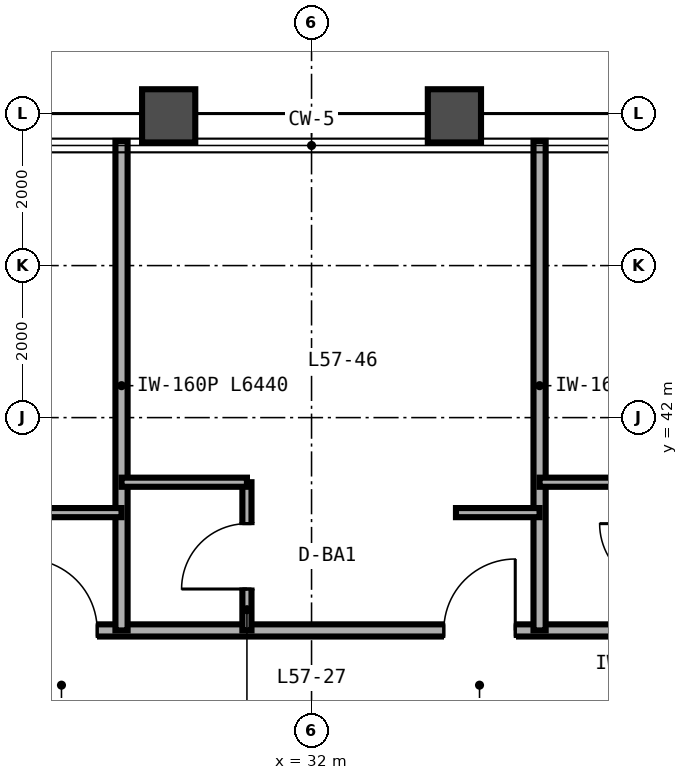
"""IFC4 building model, lengths in metres.
Left out: names, types, materials, properties, quantities, classifications, styles, units other than length and angle.
Written with IfcOpenShell. Run it as: python <this file> out.ifc"""

import sys

from ifc_helpers import new_model, si_unit, direction, frame, frame_2d, origin, place, context, subcontext, project, spatial, rectangle, extrude, source, transform, mapped, element, fill, save


model = new_model("IFC4")
c1 = context("Model", 3, precision=1e-05, world=origin(), true_north=direction((0.0, 1.0)))
c2 = subcontext(c1, "Body", "Model", "MODEL_VIEW")
j1 = project(units=[si_unit("LENGTHUNIT", "METRE"), si_unit("PLANEANGLEUNIT", "RADIAN")], contexts=[c1])
p1 = place(None, origin())
s1 = spatial("IfcSite", under=j1, at=p1, CompositionType="ELEMENT")
p2 = place(p1, origin())
s2 = spatial("IfcBuilding", under=s1, at=p2, CompositionType="ELEMENT")
p3 = place(p2, frame((0.0, 0.0, 228.0)))
s3 = spatial("IfcBuildingStorey", under=s2, at=p3, CompositionType="ELEMENT", Elevation=228.0)
p4 = place(p3, frame((14.0, 39.2, 0.0), z_axis=(0.0, 0.0, 1.0), x_axis=(1.0, 0.0, 0.0)))
e1 = element("IfcWall", 1, at=p4, inside=s3, PredefinedType="PARTITIONING", context=c2, shape_type="SweptSolid", body=[
    extrude(rectangle(XDim=36.0, YDim=0.16, at=frame_2d((18.0, 0.0))), origin(), (0.0, 0.0, 1.0), 4.123),
])
p5 = place(p4, frame((3.74, 0.0, 0.0)))
e2 = element("IfcOpeningElement", 2, at=p5, cuts=e1, PredefinedType="OPENING", context=c2, shape_type="SweptSolid", body=[
    extrude(rectangle(XDim=0.94, YDim=2.15, at=frame_2d((0.47, 1.075))), frame((0.0, 0.09, 0.0), z_axis=(0.0, -1.0, 0.0), x_axis=(1.0, 0.0, 0.0)), (0.0, 0.0, 1.0), 0.18),
])
p6 = place(p4, frame((8.74, 0.0, 0.0)))
e3 = element("IfcOpeningElement", 3, at=p6, cuts=e1, PredefinedType="OPENING", context=c2, shape_type="SweptSolid", body=[
    extrude(rectangle(XDim=0.94, YDim=2.15, at=frame_2d((0.47, 1.075))), frame((0.0, 0.09, 0.0), z_axis=(0.0, -1.0, 0.0), x_axis=(1.0, 0.0, 0.0)), (0.0, 0.0, 1.0), 0.18),
])
p7 = place(p4, frame((14.24, 0.0, 0.0)))
e4 = element("IfcOpeningElement", 4, at=p7, cuts=e1, PredefinedType="OPENING", context=c2, shape_type="SweptSolid", body=[
    extrude(rectangle(XDim=0.94, YDim=2.15, at=frame_2d((0.47, 1.075))), frame((0.0, 0.09, 0.0), z_axis=(0.0, -1.0, 0.0), x_axis=(1.0, 0.0, 0.0)), (0.0, 0.0, 1.0), 0.18),
])
p8 = place(p4, frame((19.74, 0.0, 0.0)))
e5 = element("IfcOpeningElement", 5, at=p8, cuts=e1, PredefinedType="OPENING", context=c2, shape_type="SweptSolid", body=[
    extrude(rectangle(XDim=0.94, YDim=2.15, at=frame_2d((0.47, 1.075))), frame((0.0, 0.09, 0.0), z_axis=(0.0, -1.0, 0.0), x_axis=(1.0, 0.0, 0.0)), (0.0, 0.0, 1.0), 0.18),
])
p9 = place(p4, frame((25.24, 0.0, 0.0)))
e6 = element("IfcOpeningElement", 6, at=p9, cuts=e1, PredefinedType="OPENING", context=c2, shape_type="SweptSolid", body=[
    extrude(rectangle(XDim=0.94, YDim=2.15, at=frame_2d((0.47, 1.075))), frame((0.0, 0.09, 0.0), z_axis=(0.0, -1.0, 0.0), x_axis=(1.0, 0.0, 0.0)), (0.0, 0.0, 1.0), 0.18),
])
p10 = place(p4, frame((30.24, 0.0, 0.0)))
e7 = element("IfcOpeningElement", 7, at=p10, cuts=e1, PredefinedType="OPENING", context=c2, shape_type="SweptSolid", body=[
    extrude(rectangle(XDim=0.94, YDim=2.15, at=frame_2d((0.47, 1.075))), frame((0.0, 0.09, 0.0), z_axis=(0.0, -1.0, 0.0), x_axis=(1.0, 0.0, 0.0)), (0.0, 0.0, 1.0), 0.18),
])
p11 = place(p4, frame((34.74, 0.0, 0.0)))
e8 = element("IfcOpeningElement", 8, at=p11, cuts=e1, PredefinedType="OPENING", context=c2, shape_type="SweptSolid", body=[
    extrude(rectangle(XDim=0.94, YDim=2.15, at=frame_2d((0.47, 1.075))), frame((0.0, 0.09, 0.0), z_axis=(0.0, -1.0, 0.0), x_axis=(1.0, 0.0, 0.0)), (0.0, 0.0, 1.0), 0.18),
])
p12 = place(p3, frame((29.5, 39.2, 0.0), z_axis=(0.0, 0.0, 1.0), x_axis=(0.0, 1.0, 0.0)))
e9 = element("IfcWall", 9, at=p12, inside=s3, PredefinedType="PARTITIONING", context=c2, shape_type="SweptSolid", body=[
    extrude(rectangle(XDim=6.44, YDim=0.16, at=frame_2d((3.22, 0.0))), origin(), (0.0, 0.0, 1.0), 3.653),
])
p13 = place(p3, frame((28.4, 40.75, 0.0), z_axis=(0.0, 0.0, 1.0), x_axis=(1.0, 0.0, 0.0)))
e10 = element("IfcWall", 10, at=p13, inside=s3, PredefinedType="PARTITIONING", context=c2, shape_type="SweptSolid", body=[
    extrude(rectangle(XDim=1.1, YDim=0.12, at=frame_2d((0.55, 0.0))), origin(), (0.0, 0.0, 1.0), 4.58),
])
p14 = place(p3, frame((35.0, 39.2, 0.0), z_axis=(0.0, 0.0, 1.0), x_axis=(0.0, 1.0, 0.0)))
e11 = element("IfcWall", 11, at=p14, inside=s3, PredefinedType="PARTITIONING", context=c2, shape_type="SweptSolid", body=[
    extrude(rectangle(XDim=6.44, YDim=0.16, at=frame_2d((3.22, 0.0))), origin(), (0.0, 0.0, 1.0), 3.653),
])
p15 = place(p3, frame((31.15, 39.2, 0.0), z_axis=(0.0, 0.0, 1.0), x_axis=(0.0, 1.0, 0.0)))
e12 = element("IfcWall", 12, at=p15, inside=s3, PredefinedType="PARTITIONING", context=c2, shape_type="SweptSolid", body=[
    extrude(rectangle(XDim=1.95, YDim=0.12, at=frame_2d((0.975, 0.0))), origin(), (0.0, 0.0, 1.0), 4.58),
])
p16 = place(p15, frame((0.545, 0.0, 0.0)))
e13 = element("IfcOpeningElement", 13, at=p16, cuts=e12, PredefinedType="OPENING", context=c2, shape_type="SweptSolid", body=[
    extrude(rectangle(XDim=0.86, YDim=2.1, at=frame_2d((0.43, 1.05))), frame((0.0, 0.07, 0.0), z_axis=(0.0, -1.0, 0.0), x_axis=(1.0, 0.0, 0.0)), (0.0, 0.0, 1.0), 0.14),
])
p17 = place(p3, frame((29.5, 41.15, 0.0), z_axis=(0.0, 0.0, 1.0), x_axis=(1.0, 0.0, 0.0)))
e14 = element("IfcWall", 14, at=p17, inside=s3, PredefinedType="PARTITIONING", context=c2, shape_type="SweptSolid", body=[
    extrude(rectangle(XDim=1.65, YDim=0.12, at=frame_2d((0.825, 0.0))), origin(), (0.0, 0.0, 1.0), 4.58),
])
p18 = place(p3, frame((33.9, 40.75, 0.0), z_axis=(0.0, 0.0, 1.0), x_axis=(1.0, 0.0, 0.0)))
e15 = element("IfcWall", 15, at=p18, inside=s3, PredefinedType="PARTITIONING", context=c2, shape_type="SweptSolid", body=[
    extrude(rectangle(XDim=1.1, YDim=0.12, at=frame_2d((0.55, 0.0))), origin(), (0.0, 0.0, 1.0), 4.58),
])
p19 = place(p3, frame((35.0, 41.15, 0.0), z_axis=(0.0, 0.0, 1.0), x_axis=(1.0, 0.0, 0.0)))
e16 = element("IfcWall", 16, at=p19, inside=s3, PredefinedType="PARTITIONING", context=c2, shape_type="SweptSolid", body=[
    extrude(rectangle(XDim=1.65, YDim=0.12, at=frame_2d((0.825, 0.0))), origin(), (0.0, 0.0, 1.0), 4.58),
])
m1 = source(origin(), c2, "Body", "SweptSolid", [
    extrude(rectangle(XDim=0.86, YDim=2.1, at=frame_2d((0.43, 1.05))), frame((0.0, 0.025, 0.0), z_axis=(0.0, -1.0, 0.0), x_axis=(1.0, 0.0, 0.0)), (0.0, 0.0, 1.0), 0.05),
])
p20 = place(p16, origin())
e17 = element("IfcDoor", 17, at=p20, inside=s3, OperationType="SINGLE_SWING_LEFT", PredefinedType="DOOR", context=c2, shape_type="MappedRepresentation", body=[
    mapped(m1, transform((0.0, 0.0, 0.0), scale=1.0)),
])
fill(e13, e17)
m2 = source(origin(), c2, "Body", "SweptSolid", [
    extrude(rectangle(XDim=0.94, YDim=2.15, at=frame_2d((0.47, 1.075))), frame((0.0, 0.025, 0.0), z_axis=(0.0, -1.0, 0.0), x_axis=(1.0, 0.0, 0.0)), (0.0, 0.0, 1.0), 0.05),
])
p21 = place(p7, origin())
e18 = element("IfcDoor", 18, at=p21, inside=s3, OperationType="SINGLE_SWING_LEFT", PredefinedType="DOOR", context=c2, shape_type="MappedRepresentation", body=[
    mapped(m2, transform((0.0, 0.0, 0.0), scale=1.0)),
])
fill(e4, e18)
p22 = place(p8, origin())
e19 = element("IfcDoor", 19, at=p22, inside=s3, OperationType="SINGLE_SWING_RIGHT", PredefinedType="DOOR", context=c2, shape_type="MappedRepresentation", body=[
    mapped(m2, transform((0.0, 0.0, 0.0), scale=1.0)),
])
fill(e5, e19)
save(model, sys.argv[1])
